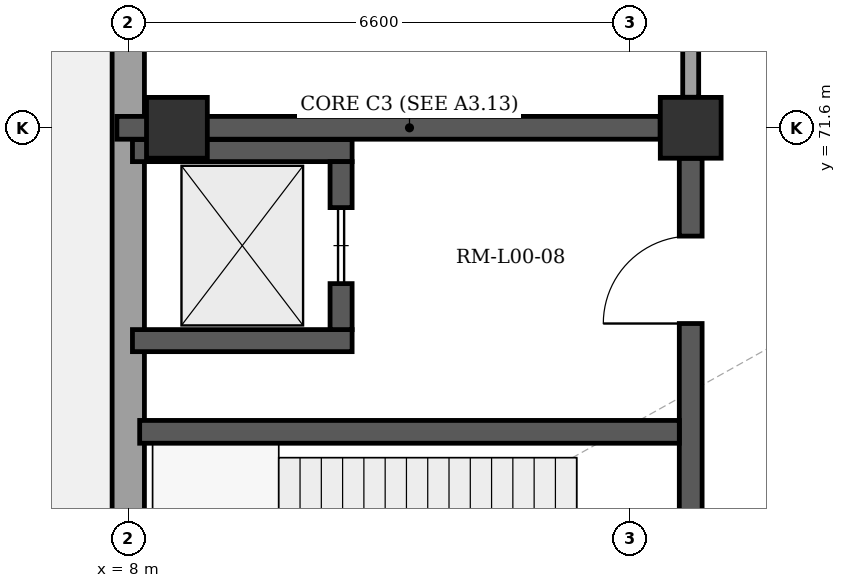
"""IFC4 building model, lengths in metres.
Left out: names, types, materials, properties, quantities, classifications, styles, units other than length and angle.
Written with IfcOpenShell. Run it as: python <this file> out.ifc"""

import sys

from ifc_helpers import new_model, si_unit, direction, frame, frame_2d, origin, origin_2d, place, context, subcontext, project, spatial, rectangle, extrude, element, fill, save


model = new_model("IFC4")
c1 = context("Model", 3, precision=1e-05, world=origin(), true_north=direction((0.0, 1.0)))
c2 = subcontext(c1, "Body", "Model", "MODEL_VIEW")
j1 = project(units=[si_unit("LENGTHUNIT", "METRE"), si_unit("PLANEANGLEUNIT", "RADIAN")], contexts=[c1])
p1 = place(None, origin())
s1 = spatial("IfcSite", under=j1, at=p1, CompositionType="ELEMENT")
p2 = place(p1, origin())
s2 = spatial("IfcBuilding", under=s1, at=p2, CompositionType="ELEMENT")
p3 = place(p2, origin())
s3 = spatial("IfcBuildingStorey", under=s2, at=p3, CompositionType="ELEMENT", Elevation=0.0)
for number, where, z_axis, x_axis in (
    (1, (8.64, 71.6, 0.0), (0.0, 0.0, 1.0), (1.0, 0.0, 0.0)),
    (2, (15.4, 71.6, 0.0), (0.0, 0.0, 1.0), (1.0, 0.0, 0.0)),
):
    element("IfcColumn", number, at=place(p3, frame(where, z_axis=z_axis, x_axis=x_axis)), inside=s3, PredefinedType="COLUMN", context=c2, shape_type="SweptSolid", body=[
        extrude(rectangle(XDim=0.8, YDim=0.8, at=origin_2d()), origin(), (0.0, 0.0, 1.0), 5.4),
    ])
p4 = place(p3, frame((8.0, 64.14, 0.0), z_axis=(0.0, 0.0, 1.0), x_axis=(0.0, 1.0, 0.0)))
e3 = element("IfcWall", 3, at=p4, inside=s3, PredefinedType="SOLIDWALL", context=c2, shape_type="SweptSolid", body=[
    extrude(rectangle(XDim=29.72, YDim=0.425, at=frame_2d((14.86, 0.0))), origin(), (0.0, 0.0, 1.0), 5.12),
])
p5 = place(p4, frame((1.1, 0.0, 0.0)))
e4 = element("IfcOpeningElement", 4, at=p5, cuts=e3, PredefinedType="OPENING", context=c2, shape_type="SweptSolid", body=[
    extrude(rectangle(XDim=1.15, YDim=2.2, at=frame_2d((0.575, 1.1))), frame((0.0, 0.222, 0.0), z_axis=(0.0, -1.0, 0.0), x_axis=(1.0, 0.0, 0.0)), (0.0, 0.0, 1.0), 0.445),
])
p6 = place(p4, frame((18.86, 0.0, 0.0)))
e5 = element("IfcOpeningElement", 5, at=p6, cuts=e3, PredefinedType="OPENING", context=c2, shape_type="SweptSolid", body=[
    extrude(rectangle(XDim=2.0, YDim=2.5, at=frame_2d((1.0, 1.25))), frame((0.0, 0.222, 0.0), z_axis=(0.0, -1.0, 0.0), x_axis=(1.0, 0.0, 0.0)), (0.0, 0.0, 1.0), 0.445),
])
p7 = place(p3, frame((7.85, 71.6, 0.0), z_axis=(0.0, 0.0, 1.0), x_axis=(1.0, 0.0, 0.0)))
e6 = element("IfcWall", 6, at=p7, inside=s3, PredefinedType="SHEAR", context=c2, shape_type="SweptSolid", body=[
    extrude(rectangle(XDim=7.148, YDim=0.3, at=frame_2d((3.574, 0.0))), origin(), (0.0, 0.0, 1.0), 5.12),
])
p8 = place(p3, frame((15.4, 64.15, 0.0), z_axis=(0.0, 0.0, 1.0), x_axis=(0.0, 1.0, 0.0)))
e7 = element("IfcWall", 7, at=p8, inside=s3, PredefinedType="SHEAR", context=c2, shape_type="SweptSolid", body=[
    extrude(rectangle(XDim=7.048, YDim=0.3, at=frame_2d((3.524, 0.0))), origin(), (0.0, 0.0, 1.0), 5.12),
])
p9 = place(p8, frame((1.1, 0.0, 0.0)))
e8 = element("IfcOpeningElement", 8, at=p9, cuts=e7, PredefinedType="OPENING", context=c2, shape_type="SweptSolid", body=[
    extrude(rectangle(XDim=1.1, YDim=2.15, at=frame_2d((0.55, 1.075))), frame((0.0, 0.16, 0.0), z_axis=(0.0, -1.0, 0.0), x_axis=(1.0, 0.0, 0.0)), (0.0, 0.0, 1.0), 0.32),
])
p10 = place(p8, frame((4.875, 0.0, 0.0)))
e9 = element("IfcOpeningElement", 9, at=p10, cuts=e7, PredefinedType="OPENING", context=c2, shape_type="SweptSolid", body=[
    extrude(rectangle(XDim=1.15, YDim=2.2, at=frame_2d((0.575, 1.1))), frame((0.0, 0.16, 0.0), z_axis=(0.0, -1.0, 0.0), x_axis=(1.0, 0.0, 0.0)), (0.0, 0.0, 1.0), 0.32),
])
p11 = place(p3, frame((8.15, 67.6, 0.0), z_axis=(0.0, 0.0, 1.0), x_axis=(1.0, 0.0, 0.0)))
e10 = element("IfcWall", 10, at=p11, inside=s3, PredefinedType="SHEAR", context=c2, shape_type="SweptSolid", body=[
    extrude(rectangle(XDim=7.1, YDim=0.3, at=frame_2d((3.55, 0.0))), origin(), (0.0, 0.0, 1.0), 5.12),
])
for number, where, z_axis, x_axis in (
    (11, (8.055, 68.8, 0.0), (0.0, 0.0, 1.0), (1.0, 0.0, 0.0)),
    (12, (8.055, 71.3, 0.0), (0.0, 0.0, 1.0), (1.0, 0.0, 0.0)),
):
    element("IfcWall", number, at=place(p3, frame(where, z_axis=z_axis, x_axis=x_axis)), inside=s3, PredefinedType="SHEAR", context=c2, shape_type="SweptSolid", body=[
        extrude(rectangle(XDim=2.89, YDim=0.29, at=frame_2d((1.445, 0.0))), origin(), (0.0, 0.0, 1.0), 5.12),
    ])
p12 = place(p3, frame((10.8, 68.945, 0.0), z_axis=(0.0, 0.0, 1.0), x_axis=(0.0, 1.0, 0.0)))
e13 = element("IfcWall", 13, at=p12, inside=s3, PredefinedType="SHEAR", context=c2, shape_type="SweptSolid", body=[
    extrude(rectangle(XDim=2.21, YDim=0.29, at=frame_2d((1.105, 0.0))), origin(), (0.0, 0.0, 1.0), 5.12),
])
p13 = place(p12, frame((0.605, 0.0, 0.0)))
e14 = element("IfcOpeningElement", 14, at=p13, cuts=e13, PredefinedType="OPENING", context=c2, shape_type="SweptSolid", body=[
    extrude(rectangle(XDim=1.0, YDim=2.15, at=frame_2d((0.5, 1.075))), frame((0.0, 0.155, 0.0), z_axis=(0.0, -1.0, 0.0), x_axis=(1.0, 0.0, 0.0)), (0.0, 0.0, 1.0), 0.31),
])
p14 = place(p3, frame((15.4, 72.002, 0.0), z_axis=(0.0, 0.0, 1.0), x_axis=(0.0, 1.0, 0.0)))
e15 = element("IfcWall", 15, at=p14, inside=s3, PredefinedType="PARTITIONING", context=c2, shape_type="SweptSolid", body=[
    extrude(rectangle(XDim=7.196, YDim=0.21, at=frame_2d((3.598, 0.0))), origin(), (0.0, 0.0, 1.0), 4.27),
])
p15 = place(p14, frame((2.988, 0.0, 0.0)))
e16 = element("IfcOpeningElement", 16, at=p15, cuts=e15, PredefinedType="OPENING", context=c2, shape_type="SweptSolid", body=[
    extrude(rectangle(XDim=1.22, YDim=2.2, at=frame_2d((0.61, 1.1))), frame((0.0, 0.115, 0.0), z_axis=(0.0, -1.0, 0.0), x_axis=(1.0, 0.0, 0.0)), (0.0, 0.0, 1.0), 0.23),
])
p16 = place(p10, origin())
e17 = element("IfcDoor", 17, at=p16, inside=s3, OperationType="SINGLE_SWING_LEFT", PredefinedType="DOOR", context=c2, shape_type="SweptSolid", body=[
    extrude(rectangle(XDim=1.15, YDim=2.2, at=frame_2d((0.575, 1.1))), frame((0.0, 0.025, 0.0), z_axis=(0.0, -1.0, 0.0), x_axis=(1.0, 0.0, 0.0)), (0.0, 0.0, 1.0), 0.05),
])
fill(e9, e17)
p17 = place(p13, origin())
e18 = element("IfcDoor", 18, at=p17, inside=s3, OperationType="SLIDING_TO_LEFT", PredefinedType="DOOR", context=c2, shape_type="SweptSolid", body=[
    extrude(rectangle(XDim=1.0, YDim=2.15, at=frame_2d((0.5, 1.075))), frame((0.0, 0.025, 0.0), z_axis=(0.0, -1.0, 0.0), x_axis=(1.0, 0.0, 0.0)), (0.0, 0.0, 1.0), 0.05),
])
fill(e14, e18)
save(model, sys.argv[1])
